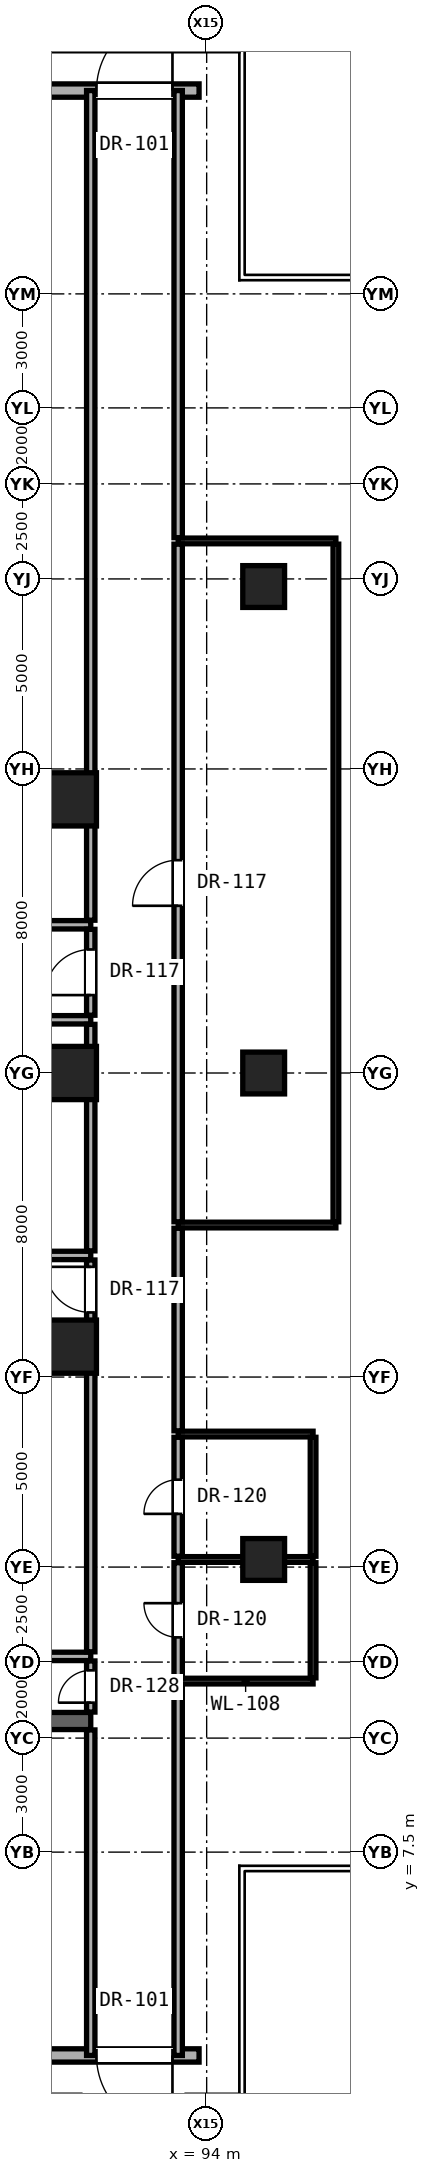
"""IFC4 building model, lengths in metres.
Left out: names, types, materials, properties, quantities, classifications, styles, units other than length and angle.
Written with IfcOpenShell. Run it as: python <this file> out.ifc"""

import sys

from ifc_helpers import new_model, si_unit, direction, frame, frame_2d, origin, origin_2d, place, context, subcontext, project, spatial, rectangle, hollow_rectangle, extrude, element, fill, save


model = new_model("IFC4")
c1 = context("Model", 3, precision=1e-05, world=origin(), true_north=direction((0.0, 1.0)))
c2 = subcontext(c1, "Body", "Model", "MODEL_VIEW")
j1 = project(units=[si_unit("LENGTHUNIT", "METRE"), si_unit("PLANEANGLEUNIT", "RADIAN")], contexts=[c1])
p1 = place(None, origin())
s1 = spatial("IfcSite", under=j1, at=p1, CompositionType="ELEMENT")
p2 = place(p1, origin())
s2 = spatial("IfcBuilding", under=s1, at=p2, CompositionType="ELEMENT")
p3 = place(p2, origin())
s3 = spatial("IfcBuildingStorey", under=s2, at=p3, CompositionType="ELEMENT", Elevation=0.0)
for number, where, z_axis, x_axis in (
    (1, (90.4, 20.8, 0.0), (0.0, 0.0, 1.0), (1.0, 0.0, 0.0)),
    (2, (90.4, 28.0, 0.0), (0.0, 0.0, 1.0), (1.0, 0.0, 0.0)),
    (3, (90.4, 35.2, 0.0), (0.0, 0.0, 1.0), (1.0, 0.0, 0.0)),
):
    element("IfcColumn", number, at=place(p3, frame(where, z_axis=z_axis, x_axis=x_axis)), inside=s3, PredefinedType="COLUMN", context=c2, shape_type="SweptSolid", body=[
        extrude(hollow_rectangle(XDim=1.4, YDim=1.4, WallThickness=0.08, at=origin_2d()), origin(), (0.0, 0.0, 1.0), 5.2),
    ])
for number, where, z_axis, x_axis in (
    (4, (95.5, 15.2, 0.0), (0.0, 0.0, 1.0), (1.0, 0.0, 0.0)),
    (5, (95.5, 28.0, 0.0), (0.0, 0.0, 1.0), (1.0, 0.0, 0.0)),
    (6, (95.5, 40.8, 0.0), (0.0, 0.0, 1.0), (1.0, 0.0, 0.0)),
):
    element("IfcColumn", number, at=place(p3, frame(where, z_axis=z_axis, x_axis=x_axis)), inside=s3, PredefinedType="COLUMN", context=c2, shape_type="SweptSolid", body=[
        extrude(rectangle(XDim=1.1, YDim=1.1, at=origin_2d()), origin(), (0.0, 0.0, 1.0), 5.2),
    ])
p4 = place(p3, frame((93.8, 2.15, 0.0), z_axis=(0.0, 0.0, 1.0), x_axis=(-1.0, 0.0, 0.0)))
e7 = element("IfcWall", 7, at=p4, inside=s3, PredefinedType="SOLIDWALL", context=c2, shape_type="SweptSolid", body=[
    extrude(rectangle(XDim=29.4, YDim=0.35, at=frame_2d((14.7, 0.0))), origin(), (0.0, 0.0, 1.0), 4.86),
])
p5 = place(p4, frame((17.8, 0.0, 0.85)))
e8 = element("IfcOpeningElement", 8, at=p5, cuts=e7, PredefinedType="OPENING", context=c2, shape_type="SweptSolid", body=[
    extrude(rectangle(XDim=2.4, YDim=2.6, at=frame_2d((1.2, 1.3))), frame((0.0, 0.185, 0.0), z_axis=(0.0, -1.0, 0.0), x_axis=(1.0, 0.0, 0.0)), (0.0, 0.0, 1.0), 0.37),
])
p6 = place(p4, frame((21.0, 0.0, 0.85)))
e9 = element("IfcOpeningElement", 9, at=p6, cuts=e7, PredefinedType="OPENING", context=c2, shape_type="SweptSolid", body=[
    extrude(rectangle(XDim=1.8, YDim=2.4, at=frame_2d((0.9, 1.2))), frame((0.0, 0.185, 0.0), z_axis=(0.0, -1.0, 0.0), x_axis=(1.0, 0.0, 0.0)), (0.0, 0.0, 1.0), 0.37),
])
p7 = place(p4, frame((0.7, 0.0, 0.0)))
e10 = element("IfcOpeningElement", 10, at=p7, cuts=e7, PredefinedType="OPENING", context=c2, shape_type="SweptSolid", body=[
    extrude(rectangle(XDim=2.0, YDim=2.4, at=frame_2d((1.0, 1.2))), frame((0.0, 0.185, 0.0), z_axis=(0.0, -1.0, 0.0), x_axis=(1.0, 0.0, 0.0)), (0.0, 0.0, 1.0), 0.37),
])
p8 = place(p4, frame((11.0, 0.0, 0.0)))
e11 = element("IfcOpeningElement", 11, at=p8, cuts=e7, PredefinedType="OPENING", context=c2, shape_type="SweptSolid", body=[
    extrude(rectangle(XDim=1.8, YDim=2.5, at=frame_2d((0.9, 1.25))), frame((0.0, 0.185, 0.0), z_axis=(0.0, -1.0, 0.0), x_axis=(1.0, 0.0, 0.0)), (0.0, 0.0, 1.0), 0.37),
])
p9 = place(p4, frame((25.85, 0.0, 0.0)))
e12 = element("IfcOpeningElement", 12, at=p9, cuts=e7, PredefinedType="OPENING", context=c2, shape_type="SweptSolid", body=[
    extrude(rectangle(XDim=2.0, YDim=2.4, at=frame_2d((1.0, 1.2))), frame((0.0, 0.185, 0.0), z_axis=(0.0, -1.0, 0.0), x_axis=(1.0, 0.0, 0.0)), (0.0, 0.0, 1.0), 0.37),
])
p10 = place(p3, frame((66.2, 53.85, 0.0), z_axis=(0.0, 0.0, 1.0), x_axis=(1.0, 0.0, 0.0)))
e13 = element("IfcWall", 13, at=p10, inside=s3, PredefinedType="SOLIDWALL", context=c2, shape_type="SweptSolid", body=[
    extrude(rectangle(XDim=27.6, YDim=0.35, at=frame_2d((13.8, 0.0))), origin(), (0.0, 0.0, 1.0), 4.86),
])
p11 = place(p10, frame((10.0, 0.0, 0.85)))
e14 = element("IfcOpeningElement", 14, at=p11, cuts=e13, PredefinedType="OPENING", context=c2, shape_type="SweptSolid", body=[
    extrude(rectangle(XDim=1.8, YDim=2.4, at=frame_2d((0.9, 1.2))), frame((0.0, 0.185, 0.0), z_axis=(0.0, -1.0, 0.0), x_axis=(1.0, 0.0, 0.0)), (0.0, 0.0, 1.0), 0.37),
])
p12 = place(p10, frame((15.0, 0.0, 0.85)))
e15 = element("IfcOpeningElement", 15, at=p12, cuts=e13, PredefinedType="OPENING", context=c2, shape_type="SweptSolid", body=[
    extrude(rectangle(XDim=2.4, YDim=2.6, at=frame_2d((1.2, 1.3))), frame((0.0, 0.185, 0.0), z_axis=(0.0, -1.0, 0.0), x_axis=(1.0, 0.0, 0.0)), (0.0, 0.0, 1.0), 0.37),
])
p13 = place(p10, frame((5.8, 0.0, 0.0)))
e16 = element("IfcOpeningElement", 16, at=p13, cuts=e13, PredefinedType="OPENING", context=c2, shape_type="SweptSolid", body=[
    extrude(rectangle(XDim=2.0, YDim=2.4, at=frame_2d((1.0, 1.2))), frame((0.0, 0.185, 0.0), z_axis=(0.0, -1.0, 0.0), x_axis=(1.0, 0.0, 0.0)), (0.0, 0.0, 1.0), 0.37),
])
p14 = place(p10, frame((24.9, 0.0, 0.0)))
e17 = element("IfcOpeningElement", 17, at=p14, cuts=e13, PredefinedType="OPENING", context=c2, shape_type="SweptSolid", body=[
    extrude(rectangle(XDim=2.0, YDim=2.4, at=frame_2d((1.0, 1.2))), frame((0.0, 0.185, 0.0), z_axis=(0.0, -1.0, 0.0), x_axis=(1.0, 0.0, 0.0)), (0.0, 0.0, 1.0), 0.37),
])
p15 = place(p3, frame((61.8, 10.95, 0.0), z_axis=(0.0, 0.0, 1.0), x_axis=(1.0, 0.0, 0.0)))
e18 = element("IfcWall", 18, at=p15, inside=s3, PredefinedType="SHEAR", context=c2, shape_type="SweptSolid", body=[
    extrude(rectangle(XDim=29.15, YDim=0.45, at=frame_2d((14.575, 0.0))), origin(), (0.0, 0.0, 1.0), 4.88),
])
p16 = place(p15, frame((4.55, 0.0, 0.0)))
e19 = element("IfcOpeningElement", 19, at=p16, cuts=e18, PredefinedType="OPENING", context=c2, shape_type="SweptSolid", body=[
    extrude(rectangle(XDim=1.2, YDim=2.25, at=frame_2d((0.6, 1.125))), frame((0.0, 0.235, 0.0), z_axis=(0.0, -1.0, 0.0), x_axis=(1.0, 0.0, 0.0)), (0.0, 0.0, 1.0), 0.47),
])
p17 = place(p15, frame((7.57, 0.0, 0.0)))
e20 = element("IfcOpeningElement", 20, at=p17, cuts=e18, PredefinedType="OPENING", context=c2, shape_type="SweptSolid", body=[
    extrude(rectangle(XDim=1.15, YDim=2.2, at=frame_2d((0.575, 1.1))), frame((0.0, 0.235, 0.0), z_axis=(0.0, -1.0, 0.0), x_axis=(1.0, 0.0, 0.0)), (0.0, 0.0, 1.0), 0.47),
])
p18 = place(p15, frame((21.555, 0.0, 0.0)))
e21 = element("IfcOpeningElement", 21, at=p18, cuts=e18, PredefinedType="OPENING", context=c2, shape_type="SweptSolid", body=[
    extrude(rectangle(XDim=1.2, YDim=2.25, at=frame_2d((0.6, 1.125))), frame((0.0, 0.235, 0.0), z_axis=(0.0, -1.0, 0.0), x_axis=(1.0, 0.0, 0.0)), (0.0, 0.0, 1.0), 0.47),
])
p19 = place(p3, frame((93.25, 12.0, 0.0), z_axis=(0.0, 0.0, 1.0), x_axis=(1.0, 0.0, 0.0)))
e22 = element("IfcWall", 22, at=p19, inside=s3, PredefinedType="PARTITIONING", context=c2, shape_type="SweptSolid", body=[
    extrude(rectangle(XDim=3.55, YDim=0.15, at=frame_2d((1.775, 0.0))), origin(), (0.0, 0.0, 1.0), 4.88),
])
p20 = place(p3, frame((61.8, 12.65, 0.0), z_axis=(0.0, 0.0, 1.0), x_axis=(1.0, 0.0, 0.0)))
e23 = element("IfcWall", 23, at=p20, inside=s3, PredefinedType="SOLIDWALL", context=c2, shape_type="SweptSolid", body=[
    extrude(rectangle(XDim=29.15, YDim=0.22, at=frame_2d((14.575, 0.0))), origin(), (0.0, 0.0, 1.0), 4.016),
])
for number, where, z_axis, x_axis in (
    (24, (93.25, 15.2, 0.0), (0.0, 0.0, 1.0), (1.0, 0.0, 0.0)),
    (25, (93.25, 18.5, 0.0), (0.0, 0.0, 1.0), (1.0, 0.0, 0.0)),
):
    element("IfcWall", number, at=place(p3, frame(where, z_axis=z_axis, x_axis=x_axis)), inside=s3, PredefinedType="PARTITIONING", context=c2, shape_type="SweptSolid", body=[
        extrude(rectangle(XDim=3.55, YDim=0.15, at=frame_2d((1.775, 0.0))), origin(), (0.0, 0.0, 1.0), 4.016),
    ])
p21 = place(p3, frame((85.37, 20.8, 0.0), z_axis=(0.0, 0.0, 1.0), x_axis=(1.0, 0.0, 0.0)))
e26 = element("IfcWall", 26, at=p21, inside=s3, PredefinedType="SOLIDWALL", context=c2, shape_type="SweptSolid", body=[
    extrude(rectangle(XDim=5.58, YDim=0.22, at=frame_2d((2.79, 0.0))), origin(), (0.0, 0.0, 1.0), 3.772),
])
p22 = place(p3, frame((61.8, 23.2, 0.0), z_axis=(0.0, 0.0, 1.0), x_axis=(1.0, 0.0, 0.0)))
e27 = element("IfcWall", 27, at=p22, inside=s3, PredefinedType="SOLIDWALL", context=c2, shape_type="SweptSolid", body=[
    extrude(rectangle(XDim=29.15, YDim=0.22, at=frame_2d((14.575, 0.0))), origin(), (0.0, 0.0, 1.0), 3.945),
])
p23 = place(p22, frame((6.225, 0.0, 0.0)))
e28 = element("IfcOpeningElement", 28, at=p23, cuts=e27, PredefinedType="OPENING", context=c2, shape_type="SweptSolid", body=[
    extrude(rectangle(XDim=0.9, YDim=2.1, at=frame_2d((0.45, 1.05))), frame((0.0, 0.12, 0.0), z_axis=(0.0, -1.0, 0.0), x_axis=(1.0, 0.0, 0.0)), (0.0, 0.0, 1.0), 0.24),
])
p24 = place(p22, frame((15.075, 0.0, 0.0)))
e29 = element("IfcOpeningElement", 29, at=p24, cuts=e27, PredefinedType="OPENING", context=c2, shape_type="SweptSolid", body=[
    extrude(rectangle(XDim=1.2, YDim=2.25, at=frame_2d((0.6, 1.125))), frame((0.0, 0.12, 0.0), z_axis=(0.0, -1.0, 0.0), x_axis=(1.0, 0.0, 0.0)), (0.0, 0.0, 1.0), 0.24),
])
p25 = place(p3, frame((93.25, 24.0, 0.0), z_axis=(0.0, 0.0, 1.0), x_axis=(1.0, 0.0, 0.0)))
e30 = element("IfcWall", 30, at=p25, inside=s3, PredefinedType="PARTITIONING", context=c2, shape_type="SweptSolid", body=[
    extrude(rectangle(XDim=4.15, YDim=0.15, at=frame_2d((2.075, 0.0))), origin(), (0.0, 0.0, 1.0), 4.016),
])
p26 = place(p3, frame((85.22, 29.4, 0.0), z_axis=(0.0, 0.0, 1.0), x_axis=(1.0, 0.0, 0.0)))
e31 = element("IfcWall", 31, at=p26, inside=s3, PredefinedType="SOLIDWALL", context=c2, shape_type="SweptSolid", body=[
    extrude(rectangle(XDim=5.73, YDim=0.22, at=frame_2d((2.865, 0.0))), origin(), (0.0, 0.0, 1.0), 4.016),
])
p27 = place(p3, frame((61.8, 31.9, 0.0), z_axis=(0.0, 0.0, 1.0), x_axis=(1.0, 0.0, 0.0)))
e32 = element("IfcWall", 32, at=p27, inside=s3, PredefinedType="SOLIDWALL", context=c2, shape_type="SweptSolid", body=[
    extrude(rectangle(XDim=29.15, YDim=0.22, at=frame_2d((14.575, 0.0))), origin(), (0.0, 0.0, 1.0), 3.945),
])
p28 = place(p27, frame((7.6, 0.0, 0.0)))
e33 = element("IfcOpeningElement", 33, at=p28, cuts=e32, PredefinedType="OPENING", context=c2, shape_type="SweptSolid", body=[
    extrude(rectangle(XDim=1.2, YDim=2.25, at=frame_2d((0.6, 1.125))), frame((0.0, 0.12, 0.0), z_axis=(0.0, -1.0, 0.0), x_axis=(1.0, 0.0, 0.0)), (0.0, 0.0, 1.0), 0.24),
])
p29 = place(p27, frame((20.26, 0.0, 0.0)))
e34 = element("IfcOpeningElement", 34, at=p29, cuts=e32, PredefinedType="OPENING", context=c2, shape_type="SweptSolid", body=[
    extrude(rectangle(XDim=1.2, YDim=2.25, at=frame_2d((0.6, 1.125))), frame((0.0, 0.12, 0.0), z_axis=(0.0, -1.0, 0.0), x_axis=(1.0, 0.0, 0.0)), (0.0, 0.0, 1.0), 0.24),
])
p30 = place(p27, frame((15.64, 0.0, 0.0)))
e35 = element("IfcOpeningElement", 35, at=p30, cuts=e32, PredefinedType="OPENING", context=c2, shape_type="SweptSolid", body=[
    extrude(rectangle(XDim=1.2, YDim=2.25, at=frame_2d((0.6, 1.125))), frame((0.0, 0.12, 0.0), z_axis=(0.0, -1.0, 0.0), x_axis=(1.0, 0.0, 0.0)), (0.0, 0.0, 1.0), 0.24),
])
p31 = place(p3, frame((93.25, 42.0, 0.0), z_axis=(0.0, 0.0, 1.0), x_axis=(1.0, 0.0, 0.0)))
e36 = element("IfcWall", 36, at=p31, inside=s3, PredefinedType="PARTITIONING", context=c2, shape_type="SweptSolid", body=[
    extrude(rectangle(XDim=4.15, YDim=0.15, at=frame_2d((2.075, 0.0))), origin(), (0.0, 0.0, 1.0), 4.88),
])
p32 = place(p3, frame((90.95, 2.15, 0.0), z_axis=(0.0, 0.0, 1.0), x_axis=(0.0, 1.0, 0.0)))
e37 = element("IfcWall", 37, at=p32, inside=s3, PredefinedType="SOLIDWALL", context=c2, shape_type="SweptSolid", body=[
    extrude(rectangle(XDim=8.565, YDim=0.22, at=frame_2d((4.283, 0.0))), origin(), (0.0, 0.0, 1.0), 4.88),
])
p33 = place(p3, frame((90.95, 11.185, 0.0), z_axis=(0.0, 0.0, 1.0), x_axis=(0.0, 1.0, 0.0)))
e38 = element("IfcWall", 38, at=p33, inside=s3, PredefinedType="SOLIDWALL", context=c2, shape_type="SweptSolid", body=[
    extrude(rectangle(XDim=1.345, YDim=0.22, at=frame_2d((0.672, 0.0))), origin(), (0.0, 0.0, 1.0), 4.88),
])
p34 = place(p33, frame((0.248, 0.0, 0.0)))
e39 = element("IfcOpeningElement", 39, at=p34, cuts=e38, PredefinedType="OPENING", context=c2, shape_type="SweptSolid", body=[
    extrude(rectangle(XDim=0.85, YDim=2.01, at=frame_2d((0.425, 1.005))), frame((0.0, 0.12, 0.0), z_axis=(0.0, -1.0, 0.0), x_axis=(1.0, 0.0, 0.0)), (0.0, 0.0, 1.0), 0.24),
])
p35 = place(p3, frame((90.95, 12.77, 0.0), z_axis=(0.0, 0.0, 1.0), x_axis=(0.0, 1.0, 0.0)))
e40 = element("IfcWall", 40, at=p35, inside=s3, PredefinedType="SOLIDWALL", context=c2, shape_type="SweptSolid", body=[
    extrude(rectangle(XDim=7.91, YDim=0.22, at=frame_2d((3.955, 0.0))), origin(), (0.0, 0.0, 1.0), 4.016),
])
p36 = place(p3, frame((90.95, 20.92, 0.0), z_axis=(0.0, 0.0, 1.0), x_axis=(0.0, 1.0, 0.0)))
e41 = element("IfcWall", 41, at=p36, inside=s3, PredefinedType="SOLIDWALL", context=c2, shape_type="SweptSolid", body=[
    extrude(rectangle(XDim=2.16, YDim=0.22, at=frame_2d((1.08, 0.0))), origin(), (0.0, 0.0, 1.0), 4.88),
])
p37 = place(p36, frame((0.78, 0.0, 0.0)))
e42 = element("IfcOpeningElement", 42, at=p37, cuts=e41, PredefinedType="OPENING", context=c2, shape_type="SweptSolid", body=[
    extrude(rectangle(XDim=1.2, YDim=2.25, at=frame_2d((0.6, 1.125))), frame((0.0, 0.12, 0.0), z_axis=(0.0, -1.0, 0.0), x_axis=(1.0, 0.0, 0.0)), (0.0, 0.0, 1.0), 0.24),
])
p38 = place(p3, frame((90.95, 23.32, 0.0), z_axis=(0.0, 0.0, 1.0), x_axis=(0.0, 1.0, 0.0)))
e43 = element("IfcWall", 43, at=p38, inside=s3, PredefinedType="SOLIDWALL", context=c2, shape_type="SweptSolid", body=[
    extrude(rectangle(XDim=5.96, YDim=0.22, at=frame_2d((2.98, 0.0))), origin(), (0.0, 0.0, 1.0), 4.099),
])
p39 = place(p3, frame((90.95, 29.52, 0.0), z_axis=(0.0, 0.0, 1.0), x_axis=(0.0, 1.0, 0.0)))
e44 = element("IfcWall", 44, at=p39, inside=s3, PredefinedType="SOLIDWALL", context=c2, shape_type="SweptSolid", body=[
    extrude(rectangle(XDim=2.26, YDim=0.22, at=frame_2d((1.13, 0.0))), origin(), (0.0, 0.0, 1.0), 4.88),
])
p40 = place(p39, frame((0.53, 0.0, 0.0)))
e45 = element("IfcOpeningElement", 45, at=p40, cuts=e44, PredefinedType="OPENING", context=c2, shape_type="SweptSolid", body=[
    extrude(rectangle(XDim=1.2, YDim=2.25, at=frame_2d((0.6, 1.125))), frame((0.0, 0.12, 0.0), z_axis=(0.0, -1.0, 0.0), x_axis=(1.0, 0.0, 0.0)), (0.0, 0.0, 1.0), 0.24),
])
p41 = place(p3, frame((90.95, 32.02, 0.0), z_axis=(0.0, 0.0, 1.0), x_axis=(0.0, 1.0, 0.0)))
e46 = element("IfcWall", 46, at=p41, inside=s3, PredefinedType="SOLIDWALL", context=c2, shape_type="SweptSolid", body=[
    extrude(rectangle(XDim=21.83, YDim=0.22, at=frame_2d((10.915, 0.0))), origin(), (0.0, 0.0, 1.0), 4.016),
])
p42 = place(p3, frame((93.25, 2.15, 0.0), z_axis=(0.0, 0.0, 1.0), x_axis=(0.0, 1.0, 0.0)))
e47 = element("IfcWall", 47, at=p42, inside=s3, PredefinedType="SOLIDWALL", context=c2, shape_type="SweptSolid", body=[
    extrude(rectangle(XDim=9.765, YDim=0.22, at=frame_2d((4.883, 0.0))), origin(), (0.0, 0.0, 1.0), 4.88),
])
p43 = place(p3, frame((93.25, 12.085, 0.0), z_axis=(0.0, 0.0, 1.0), x_axis=(0.0, 1.0, 0.0)))
e48 = element("IfcWall", 48, at=p43, inside=s3, PredefinedType="SOLIDWALL", context=c2, shape_type="SweptSolid", body=[
    extrude(rectangle(XDim=3.03, YDim=0.22, at=frame_2d((1.515, 0.0))), origin(), (0.0, 0.0, 1.0), 4.016),
])
p44 = place(p43, frame((1.065, 0.0, 0.0)))
e49 = element("IfcOpeningElement", 49, at=p44, cuts=e48, PredefinedType="OPENING", context=c2, shape_type="SweptSolid", body=[
    extrude(rectangle(XDim=0.9, YDim=2.1, at=frame_2d((0.45, 1.05))), frame((0.0, 0.12, 0.0), z_axis=(0.0, -1.0, 0.0), x_axis=(1.0, 0.0, 0.0)), (0.0, 0.0, 1.0), 0.24),
])
p45 = place(p3, frame((93.25, 15.285, 0.0), z_axis=(0.0, 0.0, 1.0), x_axis=(0.0, 1.0, 0.0)))
e50 = element("IfcWall", 50, at=p45, inside=s3, PredefinedType="SOLIDWALL", context=c2, shape_type="SweptSolid", body=[
    extrude(rectangle(XDim=3.13, YDim=0.22, at=frame_2d((1.565, 0.0))), origin(), (0.0, 0.0, 1.0), 4.016),
])
p46 = place(p45, frame((1.115, 0.0, 0.0)))
e51 = element("IfcOpeningElement", 51, at=p46, cuts=e50, PredefinedType="OPENING", context=c2, shape_type="SweptSolid", body=[
    extrude(rectangle(XDim=0.9, YDim=2.1, at=frame_2d((0.45, 1.05))), frame((0.0, 0.12, 0.0), z_axis=(0.0, -1.0, 0.0), x_axis=(1.0, 0.0, 0.0)), (0.0, 0.0, 1.0), 0.24),
])
p47 = place(p3, frame((93.25, 18.585, 0.0), z_axis=(0.0, 0.0, 1.0), x_axis=(0.0, 1.0, 0.0)))
e52 = element("IfcWall", 52, at=p47, inside=s3, PredefinedType="SOLIDWALL", context=c2, shape_type="SweptSolid", body=[
    extrude(rectangle(XDim=5.33, YDim=0.22, at=frame_2d((2.665, 0.0))), origin(), (0.0, 0.0, 1.0), 4.88),
])
p48 = place(p3, frame((93.25, 24.085, 0.0), z_axis=(0.0, 0.0, 1.0), x_axis=(0.0, 1.0, 0.0)))
e53 = element("IfcWall", 53, at=p48, inside=s3, PredefinedType="SOLIDWALL", context=c2, shape_type="SweptSolid", body=[
    extrude(rectangle(XDim=17.83, YDim=0.22, at=frame_2d((8.915, 0.0))), origin(), (0.0, 0.0, 1.0), 4.016),
])
p49 = place(p48, frame((8.315, 0.0, 0.0)))
e54 = element("IfcOpeningElement", 54, at=p49, cuts=e53, PredefinedType="OPENING", context=c2, shape_type="SweptSolid", body=[
    extrude(rectangle(XDim=1.2, YDim=2.25, at=frame_2d((0.6, 1.125))), frame((0.0, 0.12, 0.0), z_axis=(0.0, -1.0, 0.0), x_axis=(1.0, 0.0, 0.0)), (0.0, 0.0, 1.0), 0.24),
])
p50 = place(p3, frame((93.25, 42.085, 0.0), z_axis=(0.0, 0.0, 1.0), x_axis=(0.0, 1.0, 0.0)))
e55 = element("IfcWall", 55, at=p50, inside=s3, PredefinedType="SOLIDWALL", context=c2, shape_type="SweptSolid", body=[
    extrude(rectangle(XDim=11.765, YDim=0.22, at=frame_2d((5.883, 0.0))), origin(), (0.0, 0.0, 1.0), 4.88),
])
p51 = place(p3, frame((96.8, 12.085, 0.0), z_axis=(0.0, 0.0, 1.0), x_axis=(0.0, 1.0, 0.0)))
e56 = element("IfcWall", 56, at=p51, inside=s3, PredefinedType="PARTITIONING", context=c2, shape_type="SweptSolid", body=[
    extrude(rectangle(XDim=3.03, YDim=0.15, at=frame_2d((1.515, 0.0))), origin(), (0.0, 0.0, 1.0), 4.88),
])
p52 = place(p3, frame((96.8, 15.285, 0.0), z_axis=(0.0, 0.0, 1.0), x_axis=(0.0, 1.0, 0.0)))
e57 = element("IfcWall", 57, at=p52, inside=s3, PredefinedType="PARTITIONING", context=c2, shape_type="SweptSolid", body=[
    extrude(rectangle(XDim=3.13, YDim=0.15, at=frame_2d((1.565, 0.0))), origin(), (0.0, 0.0, 1.0), 4.88),
])
p53 = place(p3, frame((97.4, 24.085, 0.0), z_axis=(0.0, 0.0, 1.0), x_axis=(0.0, 1.0, 0.0)))
e58 = element("IfcWall", 58, at=p53, inside=s3, PredefinedType="PARTITIONING", context=c2, shape_type="SweptSolid", body=[
    extrude(rectangle(XDim=17.83, YDim=0.15, at=frame_2d((8.915, 0.0))), origin(), (0.0, 0.0, 1.0), 4.88),
])
p54 = place(p7, origin())
e59 = element("IfcDoor", 59, at=p54, inside=s3, OperationType="SINGLE_SWING_LEFT", PredefinedType="DOOR", context=c2, shape_type="SweptSolid", body=[
    extrude(rectangle(XDim=2.0, YDim=2.4, at=frame_2d((1.0, 1.2))), frame((0.0, 0.025, 0.0), z_axis=(0.0, -1.0, 0.0), x_axis=(1.0, 0.0, 0.0)), (0.0, 0.0, 1.0), 0.05),
])
fill(e10, e59)
p55 = place(p14, origin())
e60 = element("IfcDoor", 60, at=p55, inside=s3, OperationType="SINGLE_SWING_RIGHT", PredefinedType="DOOR", context=c2, shape_type="SweptSolid", body=[
    extrude(rectangle(XDim=2.0, YDim=2.4, at=frame_2d((1.0, 1.2))), frame((0.0, 0.025, 0.0), z_axis=(0.0, -1.0, 0.0), x_axis=(1.0, 0.0, 0.0)), (0.0, 0.0, 1.0), 0.05),
])
fill(e17, e60)
p56 = place(p37, origin())
e61 = element("IfcDoor", 61, at=p56, inside=s3, OperationType="SINGLE_SWING_RIGHT", PredefinedType="DOOR", context=c2, shape_type="SweptSolid", body=[
    extrude(rectangle(XDim=1.2, YDim=2.25, at=frame_2d((0.6, 1.125))), frame((0.0, 0.025, 0.0), z_axis=(0.0, -1.0, 0.0), x_axis=(1.0, 0.0, 0.0)), (0.0, 0.0, 1.0), 0.05),
])
fill(e42, e61)
p57 = place(p40, origin())
e62 = element("IfcDoor", 62, at=p57, inside=s3, OperationType="SINGLE_SWING_LEFT", PredefinedType="DOOR", context=c2, shape_type="SweptSolid", body=[
    extrude(rectangle(XDim=1.2, YDim=2.25, at=frame_2d((0.6, 1.125))), frame((0.0, 0.025, 0.0), z_axis=(0.0, -1.0, 0.0), x_axis=(1.0, 0.0, 0.0)), (0.0, 0.0, 1.0), 0.05),
])
fill(e45, e62)
p58 = place(p34, origin())
e63 = element("IfcDoor", 63, at=p58, inside=s3, OperationType="SINGLE_SWING_LEFT", PredefinedType="DOOR", context=c2, shape_type="SweptSolid", body=[
    extrude(rectangle(XDim=0.85, YDim=2.01, at=frame_2d((0.425, 1.005))), frame((0.0, 0.025, 0.0), z_axis=(0.0, -1.0, 0.0), x_axis=(1.0, 0.0, 0.0)), (0.0, 0.0, 1.0), 0.05),
])
fill(e39, e63)
p59 = place(p49, origin())
e64 = element("IfcDoor", 64, at=p59, inside=s3, OperationType="SINGLE_SWING_LEFT", PredefinedType="DOOR", context=c2, shape_type="SweptSolid", body=[
    extrude(rectangle(XDim=1.2, YDim=2.25, at=frame_2d((0.6, 1.125))), frame((0.0, 0.025, 0.0), z_axis=(0.0, -1.0, 0.0), x_axis=(1.0, 0.0, 0.0)), (0.0, 0.0, 1.0), 0.05),
])
fill(e54, e64)
p60 = place(p44, origin())
e65 = element("IfcDoor", 65, at=p60, inside=s3, OperationType="SINGLE_SWING_RIGHT", PredefinedType="DOOR", context=c2, shape_type="SweptSolid", body=[
    extrude(rectangle(XDim=0.9, YDim=2.1, at=frame_2d((0.45, 1.05))), frame((0.0, 0.025, 0.0), z_axis=(0.0, -1.0, 0.0), x_axis=(1.0, 0.0, 0.0)), (0.0, 0.0, 1.0), 0.05),
])
fill(e49, e65)
p61 = place(p46, origin())
e66 = element("IfcDoor", 66, at=p61, inside=s3, OperationType="SINGLE_SWING_LEFT", PredefinedType="DOOR", context=c2, shape_type="SweptSolid", body=[
    extrude(rectangle(XDim=0.9, YDim=2.1, at=frame_2d((0.45, 1.05))), frame((0.0, 0.025, 0.0), z_axis=(0.0, -1.0, 0.0), x_axis=(1.0, 0.0, 0.0)), (0.0, 0.0, 1.0), 0.05),
])
fill(e51, e66)
save(model, sys.argv[1])
